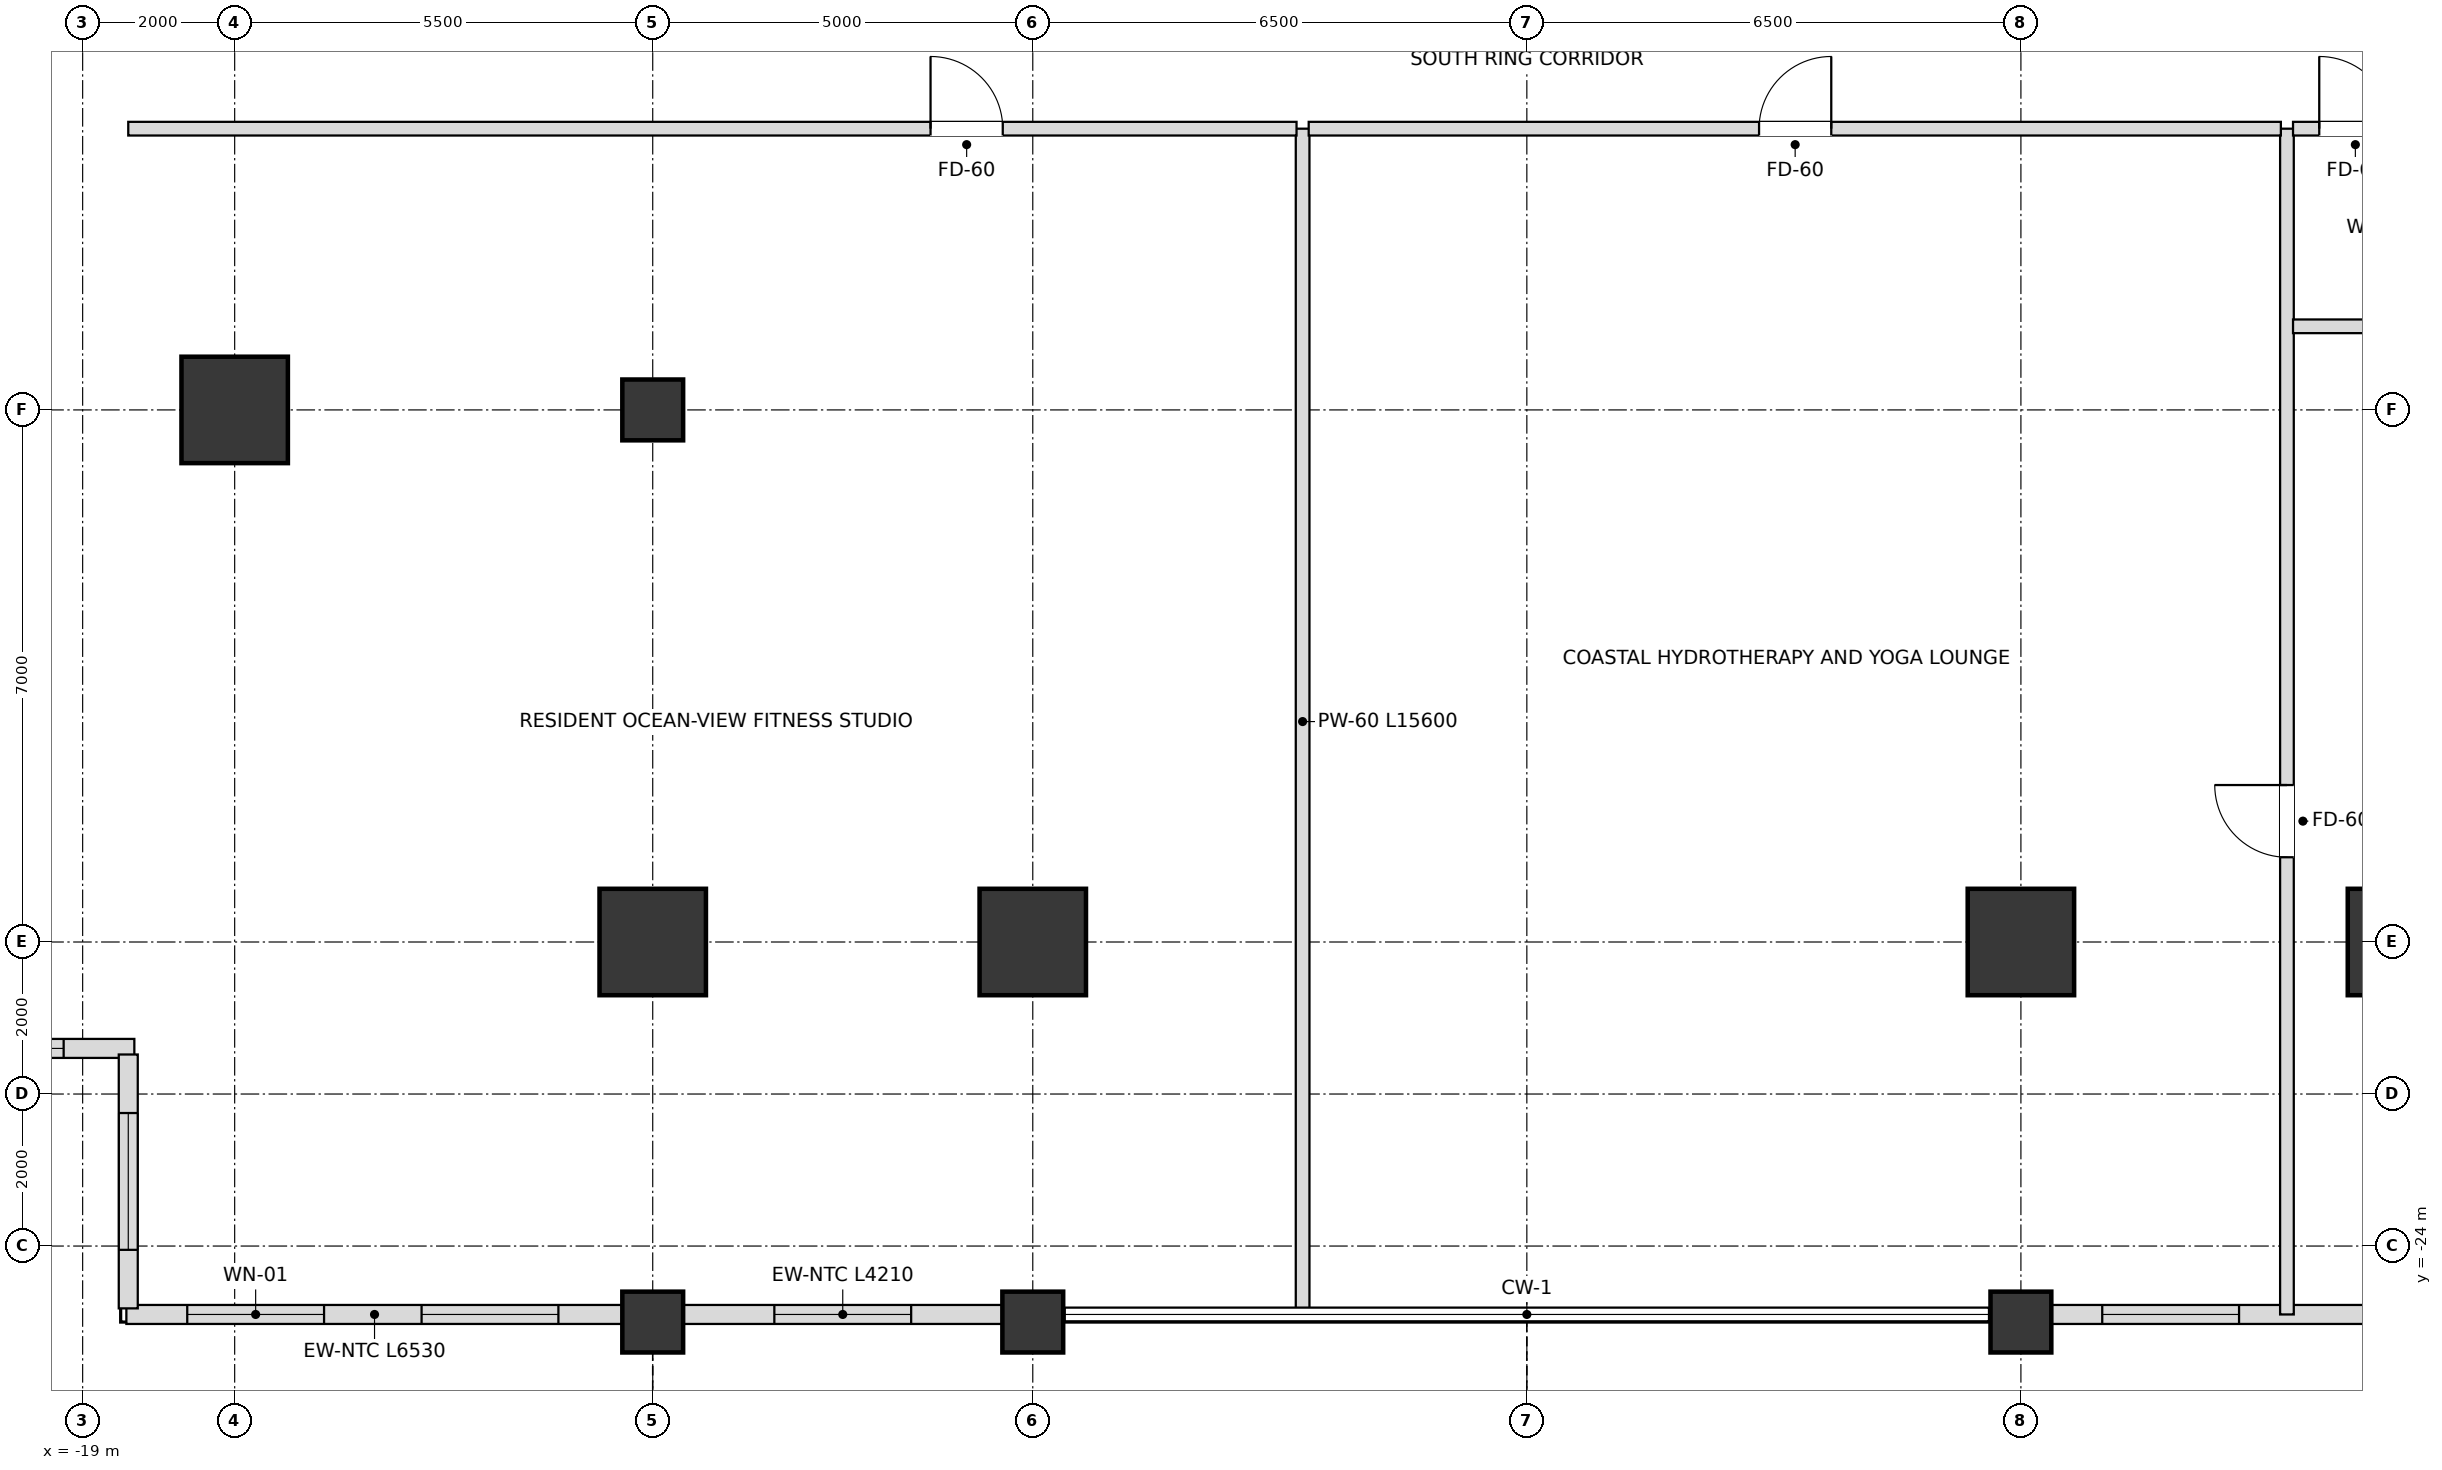
"""IFC4 building model, lengths in metres.
Left out: names, types, materials, properties, quantities, classifications, styles, units other than length and angle.
Written with IfcOpenShell. Run it as: python <this file> out.ifc"""

import sys

from ifc_helpers import new_model, si_unit, direction, frame, frame_2d, origin, origin_2d, place, context, subcontext, project, spatial, rectangle, extrude, element, fill, save


model = new_model("IFC4")
c1 = context("Model", 3, precision=1e-05, world=origin(), true_north=direction((0.0, 1.0)))
c2 = subcontext(c1, "Body", "Model", "MODEL_VIEW")
j1 = project(units=[si_unit("LENGTHUNIT", "METRE"), si_unit("PLANEANGLEUNIT", "RADIAN")], contexts=[c1])
p1 = place(None, origin())
s1 = spatial("IfcSite", under=j1, at=p1, CompositionType="ELEMENT")
p2 = place(p1, origin())
s2 = spatial("IfcBuilding", under=s1, at=p2, CompositionType="ELEMENT")
p3 = place(p2, frame((0.0, 0.0, 82.8)))
s3 = spatial("IfcBuildingStorey", under=s2, at=p3, CompositionType="ELEMENT", Elevation=82.8)
for number, where, z_axis, x_axis in (
    (1, (-11.5, -20.0, 0.0), (0.0, 0.0, 1.0), (1.0, 0.0, 0.0)),
    (2, (-6.5, -20.0, 0.0), (0.0, 0.0, 1.0), (1.0, 0.0, 0.0)),
    (3, (6.5, -20.0, 0.0), (0.0, 0.0, 1.0), (1.0, 0.0, 0.0)),
    (4, (11.5, -20.0, 0.0), (0.0, 0.0, 1.0), (1.0, 0.0, 0.0)),
    (5, (-17.0, -13.0, 0.0), (0.0, 0.0, 1.0), (1.0, 0.0, 0.0)),
):
    element("IfcColumn", number, at=place(p3, frame(where, z_axis=z_axis, x_axis=x_axis)), inside=s3, PredefinedType="USERDEFINED", context=c2, shape_type="SweptSolid", body=[
        extrude(rectangle(XDim=1.4, YDim=1.4, at=origin_2d()), origin(), (0.0, 0.0, 1.0), 3.6),
    ])
for number, where, z_axis, x_axis in (
    (6, (-11.5, -13.0, 0.0), (0.0, 0.0, 1.0), (1.0, 0.0, 0.0)),
    (7, (-11.5, -25.0, 0.0), (0.0, 0.0, 1.0), (1.0, 0.0, 0.0)),
    (8, (-6.5, -25.0, 0.0), (0.0, 0.0, 1.0), (1.0, 0.0, 0.0)),
    (9, (6.5, -25.0, 0.0), (0.0, 0.0, 1.0), (1.0, 0.0, 0.0)),
):
    element("IfcColumn", number, at=place(p3, frame(where, z_axis=z_axis, x_axis=x_axis)), inside=s3, PredefinedType="COLUMN", context=c2, shape_type="SweptSolid", body=[
        extrude(rectangle(XDim=0.8, YDim=0.8, at=origin_2d()), origin(), (0.0, 0.0, 1.0), 3.6),
    ])
p4 = place(p3, frame((-18.425, -24.9, 0.0), z_axis=(0.0, 0.0, 1.0), x_axis=(1.0, 0.0, 0.0)))
e10 = element("IfcWall", 10, at=p4, inside=s3, PredefinedType="SOLIDWALL", context=c2, shape_type="SweptSolid", body=[
    extrude(rectangle(XDim=6.53, YDim=0.25, at=frame_2d((3.265, 0.0))), origin(), (0.0, 0.0, 1.0), 2.736),
])
p5 = place(p4, frame((0.801, 0.0, 0.72)))
e11 = element("IfcOpeningElement", 11, at=p5, cuts=e10, PredefinedType="OPENING", context=c2, shape_type="SweptSolid", body=[
    extrude(rectangle(XDim=1.8, YDim=1.68, at=frame_2d((0.9, 0.84))), frame((0.0, 0.135, 0.0), z_axis=(0.0, -1.0, 0.0), x_axis=(1.0, 0.0, 0.0)), (0.0, 0.0, 1.0), 0.27),
])
p6 = place(p4, frame((3.884, 0.0, 0.72)))
e12 = element("IfcOpeningElement", 12, at=p6, cuts=e10, PredefinedType="OPENING", context=c2, shape_type="SweptSolid", body=[
    extrude(rectangle(XDim=1.8, YDim=1.68, at=frame_2d((0.9, 0.84))), frame((0.0, 0.135, 0.0), z_axis=(0.0, -1.0, 0.0), x_axis=(1.0, 0.0, 0.0)), (0.0, 0.0, 1.0), 0.27),
])
p7 = place(p3, frame((-11.105, -24.9, 0.0), z_axis=(0.0, 0.0, 1.0), x_axis=(1.0, 0.0, 0.0)))
e13 = element("IfcWall", 13, at=p7, inside=s3, PredefinedType="SOLIDWALL", context=c2, shape_type="SweptSolid", body=[
    extrude(rectangle(XDim=4.21, YDim=0.25, at=frame_2d((2.105, 0.0))), origin(), (0.0, 0.0, 1.0), 2.736),
])
p8 = place(p7, frame((1.205, 0.0, 0.72)))
e14 = element("IfcOpeningElement", 14, at=p8, cuts=e13, PredefinedType="OPENING", context=c2, shape_type="SweptSolid", body=[
    extrude(rectangle(XDim=1.8, YDim=1.68, at=frame_2d((0.9, 0.84))), frame((0.0, 0.135, 0.0), z_axis=(0.0, -1.0, 0.0), x_axis=(1.0, 0.0, 0.0)), (0.0, 0.0, 1.0), 0.27),
])
p9 = place(p3, frame((6.895, -24.9, 0.0), z_axis=(0.0, 0.0, 1.0), x_axis=(1.0, 0.0, 0.0)))
e15 = element("IfcWall", 15, at=p9, inside=s3, PredefinedType="SOLIDWALL", context=c2, shape_type="SweptSolid", body=[
    extrude(rectangle(XDim=4.21, YDim=0.25, at=frame_2d((2.105, 0.0))), origin(), (0.0, 0.0, 1.0), 2.736),
])
p10 = place(p9, frame((0.675, 0.0, 0.72)))
e16 = element("IfcOpeningElement", 16, at=p10, cuts=e15, PredefinedType="OPENING", context=c2, shape_type="SweptSolid", body=[
    extrude(rectangle(XDim=1.8, YDim=1.68, at=frame_2d((0.9, 0.84))), frame((0.0, 0.135, 0.0), z_axis=(0.0, -1.0, 0.0), x_axis=(1.0, 0.0, 0.0)), (0.0, 0.0, 1.0), 0.27),
])
p11 = place(p3, frame((-21.98, -21.4, 0.0), z_axis=(0.0, 0.0, 1.0), x_axis=(1.0, 0.0, 0.0)))
e17 = element("IfcWall", 17, at=p11, inside=s3, PredefinedType="SOLIDWALL", context=c2, shape_type="SweptSolid", body=[
    extrude(rectangle(XDim=3.66, YDim=0.25, at=frame_2d((1.83, 0.0))), origin(), (0.0, 0.0, 1.0), 2.736),
])
p12 = place(p11, frame((0.93, 0.0, 0.72)))
e18 = element("IfcOpeningElement", 18, at=p12, cuts=e17, PredefinedType="OPENING", context=c2, shape_type="SweptSolid", body=[
    extrude(rectangle(XDim=1.8, YDim=1.68, at=frame_2d((0.9, 0.84))), frame((0.0, 0.135, 0.0), z_axis=(0.0, -1.0, 0.0), x_axis=(1.0, 0.0, 0.0)), (0.0, 0.0, 1.0), 0.27),
])
p13 = place(p3, frame((-18.4, -21.48, 0.0), z_axis=(0.0, 0.0, 1.0), x_axis=(0.0, -1.0, 0.0)))
e19 = element("IfcWall", 19, at=p13, inside=s3, PredefinedType="SOLIDWALL", context=c2, shape_type="SweptSolid", body=[
    extrude(rectangle(XDim=3.34, YDim=0.25, at=frame_2d((1.67, 0.0))), origin(), (0.0, 0.0, 1.0), 2.736),
])
p14 = place(p13, frame((0.77, 0.0, 0.72)))
e20 = element("IfcOpeningElement", 20, at=p14, cuts=e19, PredefinedType="OPENING", context=c2, shape_type="SweptSolid", body=[
    extrude(rectangle(XDim=1.8, YDim=1.68, at=frame_2d((0.9, 0.84))), frame((0.0, 0.135, 0.0), z_axis=(0.0, -1.0, 0.0), x_axis=(1.0, 0.0, 0.0)), (0.0, 0.0, 1.0), 0.27),
])
p15 = place(p3, frame((-2.95, -24.9, 0.0), z_axis=(0.0, 0.0, 1.0), x_axis=(0.0, 1.0, 0.0)))
e21 = element("IfcWall", 21, at=p15, inside=s3, PredefinedType="PARTITIONING", context=c2, shape_type="SweptSolid", body=[
    extrude(rectangle(XDim=15.6, YDim=0.18, at=frame_2d((7.8, 0.0))), origin(), (0.0, 0.0, 1.0), 2.816),
])
p16 = place(p3, frame((10.0, -24.9, 0.0), z_axis=(0.0, 0.0, 1.0), x_axis=(0.0, 1.0, 0.0)))
e22 = element("IfcWall", 22, at=p16, inside=s3, PredefinedType="PARTITIONING", context=c2, shape_type="SweptSolid", body=[
    extrude(rectangle(XDim=15.6, YDim=0.18, at=frame_2d((7.8, 0.0))), origin(), (0.0, 0.0, 1.0), 2.816),
])
p17 = place(p16, frame((6.015, 0.0, 0.0)))
e23 = element("IfcOpeningElement", 23, at=p17, cuts=e22, PredefinedType="OPENING", context=c2, shape_type="SweptSolid", body=[
    extrude(rectangle(XDim=0.95, YDim=2.15, at=frame_2d((0.475, 1.075))), frame((0.0, 0.1, 0.0), z_axis=(0.0, -1.0, 0.0), x_axis=(1.0, 0.0, 0.0)), (0.0, 0.0, 1.0), 0.2),
])
p18 = place(p3, frame((10.08, -11.9, 0.0), z_axis=(0.0, 0.0, 1.0), x_axis=(1.0, 0.0, 0.0)))
e24 = element("IfcWall", 24, at=p18, inside=s3, PredefinedType="PARTITIONING", context=c2, shape_type="SweptSolid", body=[
    extrude(rectangle(XDim=8.24, YDim=0.18, at=frame_2d((4.12, 0.0))), origin(), (0.0, 0.0, 1.0), 2.816),
])
p19 = place(p3, frame((-18.4, -9.3, 0.0), z_axis=(0.0, 0.0, 1.0), x_axis=(1.0, 0.0, 0.0)))
e25 = element("IfcWall", 25, at=p19, inside=s3, PredefinedType="PARTITIONING", context=c2, shape_type="SweptSolid", body=[
    extrude(rectangle(XDim=15.37, YDim=0.18, at=frame_2d((7.685, 0.0))), origin(), (0.0, 0.0, 1.0), 2.816),
])
p20 = place(p19, frame((10.555, 0.0, 0.0)))
e26 = element("IfcOpeningElement", 26, at=p20, cuts=e25, PredefinedType="OPENING", context=c2, shape_type="SweptSolid", body=[
    extrude(rectangle(XDim=0.95, YDim=2.15, at=frame_2d((0.475, 1.075))), frame((0.0, 0.1, 0.0), z_axis=(0.0, -1.0, 0.0), x_axis=(1.0, 0.0, 0.0)), (0.0, 0.0, 1.0), 0.2),
])
p21 = place(p3, frame((-2.87, -9.3, 0.0), z_axis=(0.0, 0.0, 1.0), x_axis=(1.0, 0.0, 0.0)))
e27 = element("IfcWall", 27, at=p21, inside=s3, PredefinedType="PARTITIONING", context=c2, shape_type="SweptSolid", body=[
    extrude(rectangle(XDim=12.79, YDim=0.18, at=frame_2d((6.395, 0.0))), origin(), (0.0, 0.0, 1.0), 2.816),
])
p22 = place(p21, frame((5.925, 0.0, 0.0)))
e28 = element("IfcOpeningElement", 28, at=p22, cuts=e27, PredefinedType="OPENING", context=c2, shape_type="SweptSolid", body=[
    extrude(rectangle(XDim=0.95, YDim=2.15, at=frame_2d((0.475, 1.075))), frame((0.0, 0.1, 0.0), z_axis=(0.0, -1.0, 0.0), x_axis=(1.0, 0.0, 0.0)), (0.0, 0.0, 1.0), 0.2),
])
p23 = place(p3, frame((10.08, -9.3, 0.0), z_axis=(0.0, 0.0, 1.0), x_axis=(1.0, 0.0, 0.0)))
e29 = element("IfcWall", 29, at=p23, inside=s3, PredefinedType="PARTITIONING", context=c2, shape_type="SweptSolid", body=[
    extrude(rectangle(XDim=8.24, YDim=0.18, at=frame_2d((4.12, 0.0))), origin(), (0.0, 0.0, 1.0), 2.816),
])
p24 = place(p23, frame((0.345, 0.0, 0.0)))
e30 = element("IfcOpeningElement", 30, at=p24, cuts=e29, PredefinedType="OPENING", context=c2, shape_type="SweptSolid", body=[
    extrude(rectangle(XDim=0.95, YDim=2.15, at=frame_2d((0.475, 1.075))), frame((0.0, 0.1, 0.0), z_axis=(0.0, -1.0, 0.0), x_axis=(1.0, 0.0, 0.0)), (0.0, 0.0, 1.0), 0.2),
])
p25 = place(p5, origin())
e31 = element("IfcWindow", 31, at=p25, inside=s3, PartitioningType="SINGLE_PANEL", PredefinedType="WINDOW", context=c2, shape_type="SweptSolid", body=[
    extrude(rectangle(XDim=1.8, YDim=1.68, at=frame_2d((0.9, 0.84))), frame((0.0, 0.03, 0.0), z_axis=(0.0, -1.0, 0.0), x_axis=(1.0, 0.0, 0.0)), (0.0, 0.0, 1.0), 0.06),
])
fill(e11, e31)
p26 = place(p6, origin())
e32 = element("IfcWindow", 32, at=p26, inside=s3, PartitioningType="SINGLE_PANEL", PredefinedType="WINDOW", context=c2, shape_type="SweptSolid", body=[
    extrude(rectangle(XDim=1.8, YDim=1.68, at=frame_2d((0.9, 0.84))), frame((0.0, 0.03, 0.0), z_axis=(0.0, -1.0, 0.0), x_axis=(1.0, 0.0, 0.0)), (0.0, 0.0, 1.0), 0.06),
])
fill(e12, e32)
p27 = place(p8, origin())
e33 = element("IfcWindow", 33, at=p27, inside=s3, PartitioningType="SINGLE_PANEL", PredefinedType="WINDOW", context=c2, shape_type="SweptSolid", body=[
    extrude(rectangle(XDim=1.8, YDim=1.68, at=frame_2d((0.9, 0.84))), frame((0.0, 0.03, 0.0), z_axis=(0.0, -1.0, 0.0), x_axis=(1.0, 0.0, 0.0)), (0.0, 0.0, 1.0), 0.06),
])
fill(e14, e33)
p28 = place(p10, origin())
e34 = element("IfcWindow", 34, at=p28, inside=s3, PartitioningType="SINGLE_PANEL", PredefinedType="WINDOW", context=c2, shape_type="SweptSolid", body=[
    extrude(rectangle(XDim=1.8, YDim=1.68, at=frame_2d((0.9, 0.84))), frame((0.0, 0.03, 0.0), z_axis=(0.0, -1.0, 0.0), x_axis=(1.0, 0.0, 0.0)), (0.0, 0.0, 1.0), 0.06),
])
fill(e16, e34)
p29 = place(p12, origin())
e35 = element("IfcWindow", 35, at=p29, inside=s3, PartitioningType="SINGLE_PANEL", PredefinedType="WINDOW", context=c2, shape_type="SweptSolid", body=[
    extrude(rectangle(XDim=1.8, YDim=1.68, at=frame_2d((0.9, 0.84))), frame((0.0, 0.03, 0.0), z_axis=(0.0, -1.0, 0.0), x_axis=(1.0, 0.0, 0.0)), (0.0, 0.0, 1.0), 0.06),
])
fill(e18, e35)
p30 = place(p14, origin())
e36 = element("IfcWindow", 36, at=p30, inside=s3, PartitioningType="SINGLE_PANEL", PredefinedType="WINDOW", context=c2, shape_type="SweptSolid", body=[
    extrude(rectangle(XDim=1.8, YDim=1.68, at=frame_2d((0.9, 0.84))), frame((0.0, 0.03, 0.0), z_axis=(0.0, -1.0, 0.0), x_axis=(1.0, 0.0, 0.0)), (0.0, 0.0, 1.0), 0.06),
])
fill(e20, e36)
p31 = place(p24, origin())
e37 = element("IfcDoor", 37, at=p31, inside=s3, OperationType="SINGLE_SWING_LEFT", PredefinedType="DOOR", context=c2, shape_type="SweptSolid", body=[
    extrude(rectangle(XDim=0.95, YDim=2.15, at=frame_2d((0.475, 1.075))), frame((0.0, 0.025, 0.0), z_axis=(0.0, -1.0, 0.0), x_axis=(1.0, 0.0, 0.0)), (0.0, 0.0, 1.0), 0.05),
])
fill(e30, e37)
p32 = place(p17, origin())
e38 = element("IfcDoor", 38, at=p32, inside=s3, OperationType="SINGLE_SWING_RIGHT", PredefinedType="DOOR", context=c2, shape_type="SweptSolid", body=[
    extrude(rectangle(XDim=0.95, YDim=2.15, at=frame_2d((0.475, 1.075))), frame((0.0, 0.025, 0.0), z_axis=(0.0, -1.0, 0.0), x_axis=(1.0, 0.0, 0.0)), (0.0, 0.0, 1.0), 0.05),
])
fill(e23, e38)
p33 = place(p20, origin())
e39 = element("IfcDoor", 39, at=p33, inside=s3, OperationType="SINGLE_SWING_LEFT", PredefinedType="DOOR", context=c2, shape_type="SweptSolid", body=[
    extrude(rectangle(XDim=0.95, YDim=2.15, at=frame_2d((0.475, 1.075))), frame((0.0, 0.025, 0.0), z_axis=(0.0, -1.0, 0.0), x_axis=(1.0, 0.0, 0.0)), (0.0, 0.0, 1.0), 0.05),
])
fill(e26, e39)
p34 = place(p22, origin())
e40 = element("IfcDoor", 40, at=p34, inside=s3, OperationType="SINGLE_SWING_RIGHT", PredefinedType="DOOR", context=c2, shape_type="SweptSolid", body=[
    extrude(rectangle(XDim=0.95, YDim=2.15, at=frame_2d((0.475, 1.075))), frame((0.0, 0.025, 0.0), z_axis=(0.0, -1.0, 0.0), x_axis=(1.0, 0.0, 0.0)), (0.0, 0.0, 1.0), 0.05),
])
fill(e28, e40)
save(model, sys.argv[1])
